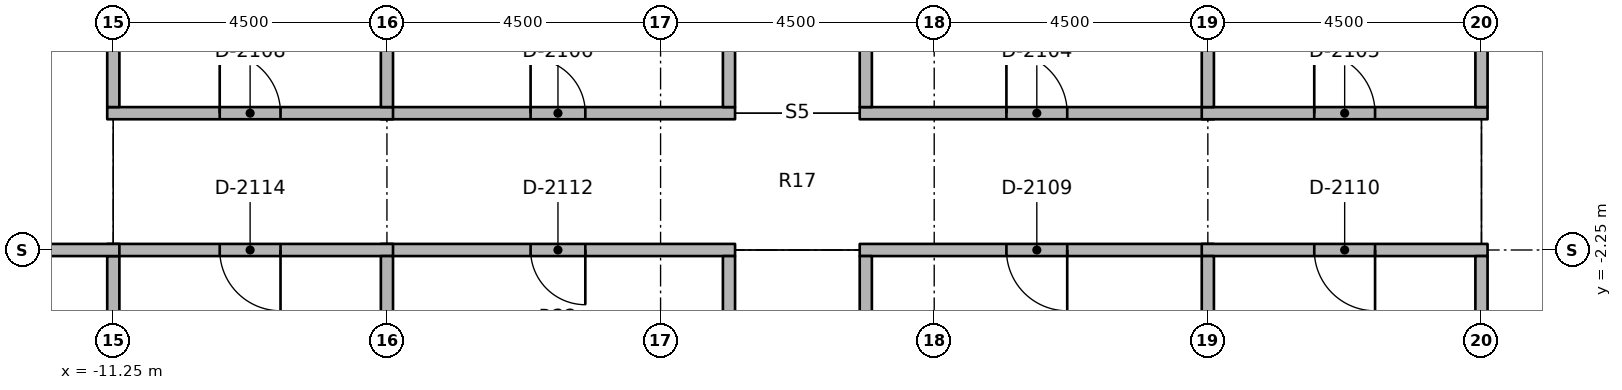
"""IFC4 building model, lengths in metres.
Left out: names, types, materials, properties, quantities, classifications, styles, units other than length and angle.
Written with IfcOpenShell. Run it as: python <this file> out.ifc"""

import sys

from ifc_helpers import new_model, si_unit, direction, frame, frame_2d, origin, place, context, subcontext, project, spatial, rectangle, extrude, element, fill, save


model = new_model("IFC4")
c1 = context("Model", 3, precision=1e-05, world=origin(), true_north=direction((0.0, 1.0)))
c2 = subcontext(c1, "Body", "Model", "MODEL_VIEW")
j1 = project(units=[si_unit("LENGTHUNIT", "METRE"), si_unit("PLANEANGLEUNIT", "RADIAN")], contexts=[c1])
p1 = place(None, origin())
s1 = spatial("IfcSite", under=j1, at=p1, CompositionType="ELEMENT")
p2 = place(p1, origin())
s2 = spatial("IfcBuilding", under=s1, at=p2, CompositionType="ELEMENT")
p3 = place(p2, frame((0.0, 0.0, 195.4)))
s3 = spatial("IfcBuildingStorey", under=s2, at=p3, CompositionType="ELEMENT", Elevation=195.4)
p4 = place(p3, frame((1.025, 0.0, 0.0), z_axis=(0.0, 0.0, 1.0), x_axis=(1.0, 0.0, 0.0)))
e1 = element("IfcWall", 1, at=p4, inside=s3, PredefinedType="PARTITIONING", context=c2, shape_type="SweptSolid", body=[
    extrude(rectangle(XDim=5.825, YDim=0.2, at=frame_2d((2.913, 0.0))), origin(), (0.0, 0.0, 1.0), 2.75),
])
p5 = place(p4, frame((2.413, 0.0, 0.0)))
e2 = element("IfcOpeningElement", 2, at=p5, cuts=e1, PredefinedType="OPENING", context=c2, shape_type="SweptSolid", body=[
    extrude(rectangle(XDim=1.0, YDim=2.1, at=frame_2d((0.5, 1.05))), frame((0.0, 0.11, 0.0), z_axis=(0.0, -1.0, 0.0), x_axis=(1.0, 0.0, 0.0)), (0.0, 0.0, 1.0), 0.22),
])
p6 = place(p3, frame((6.65, 0.0, 0.0), z_axis=(0.0, 0.0, 1.0), x_axis=(1.0, 0.0, 0.0)))
e3 = element("IfcWall", 3, at=p6, inside=s3, PredefinedType="PARTITIONING", context=c2, shape_type="SweptSolid", body=[
    extrude(rectangle(XDim=4.7, YDim=0.2, at=frame_2d((2.35, 0.0))), origin(), (0.0, 0.0, 1.0), 2.75),
])
p7 = place(p6, frame((1.85, 0.0, 0.0)))
e4 = element("IfcOpeningElement", 4, at=p7, cuts=e3, PredefinedType="OPENING", context=c2, shape_type="SweptSolid", body=[
    extrude(rectangle(XDim=1.0, YDim=2.1, at=frame_2d((0.5, 1.05))), frame((0.0, 0.11, 0.0), z_axis=(0.0, -1.0, 0.0), x_axis=(1.0, 0.0, 0.0)), (0.0, 0.0, 1.0), 0.22),
])
p8 = place(p3, frame((-6.85, 0.0, 0.0), z_axis=(0.0, 0.0, 1.0), x_axis=(1.0, 0.0, 0.0)))
e5 = element("IfcWall", 5, at=p8, inside=s3, PredefinedType="PARTITIONING", context=c2, shape_type="SweptSolid", body=[
    extrude(rectangle(XDim=5.825, YDim=0.2, at=frame_2d((2.913, 0.0))), origin(), (0.0, 0.0, 1.0), 2.75),
])
p9 = place(p8, frame((2.462, 0.0, 0.0)))
e6 = element("IfcOpeningElement", 6, at=p9, cuts=e5, PredefinedType="OPENING", context=c2, shape_type="SweptSolid", body=[
    extrude(rectangle(XDim=0.9, YDim=2.1, at=frame_2d((0.45, 1.05))), frame((0.0, 0.11, 0.0), z_axis=(0.0, -1.0, 0.0), x_axis=(1.0, 0.0, 0.0)), (0.0, 0.0, 1.0), 0.22),
])
p10 = place(p3, frame((-11.35, 0.0, 0.0), z_axis=(0.0, 0.0, 1.0), x_axis=(1.0, 0.0, 0.0)))
e7 = element("IfcWall", 7, at=p10, inside=s3, PredefinedType="PARTITIONING", context=c2, shape_type="SweptSolid", body=[
    extrude(rectangle(XDim=4.7, YDim=0.2, at=frame_2d((2.35, 0.0))), origin(), (0.0, 0.0, 1.0), 2.75),
])
p11 = place(p10, frame((1.85, 0.0, 0.0)))
e8 = element("IfcOpeningElement", 8, at=p11, cuts=e7, PredefinedType="OPENING", context=c2, shape_type="SweptSolid", body=[
    extrude(rectangle(XDim=1.0, YDim=2.1, at=frame_2d((0.5, 1.05))), frame((0.0, 0.11, 0.0), z_axis=(0.0, -1.0, 0.0), x_axis=(1.0, 0.0, 0.0)), (0.0, 0.0, 1.0), 0.22),
])
p12 = place(p3, frame((6.85, -2.25, 0.0), z_axis=(0.0, 0.0, 1.0), x_axis=(-1.0, 0.0, 0.0)))
e9 = element("IfcWall", 9, at=p12, inside=s3, PredefinedType="PARTITIONING", context=c2, shape_type="SweptSolid", body=[
    extrude(rectangle(XDim=5.825, YDim=0.2, at=frame_2d((2.913, 0.0))), origin(), (0.0, 0.0, 1.0), 2.75),
])
p13 = place(p12, frame((2.413, 0.0, 0.0)))
e10 = element("IfcOpeningElement", 10, at=p13, cuts=e9, PredefinedType="OPENING", context=c2, shape_type="SweptSolid", body=[
    extrude(rectangle(XDim=1.0, YDim=2.1, at=frame_2d((0.5, 1.05))), frame((0.0, 0.11, 0.0), z_axis=(0.0, -1.0, 0.0), x_axis=(1.0, 0.0, 0.0)), (0.0, 0.0, 1.0), 0.22),
])
p14 = place(p3, frame((11.35, -2.25, 0.0), z_axis=(0.0, 0.0, 1.0), x_axis=(-1.0, 0.0, 0.0)))
e11 = element("IfcWall", 11, at=p14, inside=s3, PredefinedType="PARTITIONING", context=c2, shape_type="SweptSolid", body=[
    extrude(rectangle(XDim=4.7, YDim=0.2, at=frame_2d((2.35, 0.0))), origin(), (0.0, 0.0, 1.0), 2.75),
])
p15 = place(p14, frame((1.85, 0.0, 0.0)))
e12 = element("IfcOpeningElement", 12, at=p15, cuts=e11, PredefinedType="OPENING", context=c2, shape_type="SweptSolid", body=[
    extrude(rectangle(XDim=1.0, YDim=2.1, at=frame_2d((0.5, 1.05))), frame((0.0, 0.11, 0.0), z_axis=(0.0, -1.0, 0.0), x_axis=(1.0, 0.0, 0.0)), (0.0, 0.0, 1.0), 0.22),
])
p16 = place(p3, frame((-1.025, -2.25, 0.0), z_axis=(0.0, 0.0, 1.0), x_axis=(-1.0, 0.0, 0.0)))
e13 = element("IfcWall", 13, at=p16, inside=s3, PredefinedType="PARTITIONING", context=c2, shape_type="SweptSolid", body=[
    extrude(rectangle(XDim=5.825, YDim=0.2, at=frame_2d((2.913, 0.0))), origin(), (0.0, 0.0, 1.0), 2.75),
])
p17 = place(p16, frame((2.462, 0.0, 0.0)))
e14 = element("IfcOpeningElement", 14, at=p17, cuts=e13, PredefinedType="OPENING", context=c2, shape_type="SweptSolid", body=[
    extrude(rectangle(XDim=0.9, YDim=2.1, at=frame_2d((0.45, 1.05))), frame((0.0, 0.11, 0.0), z_axis=(0.0, -1.0, 0.0), x_axis=(1.0, 0.0, 0.0)), (0.0, 0.0, 1.0), 0.22),
])
p18 = place(p3, frame((-6.65, -2.25, 0.0), z_axis=(0.0, 0.0, 1.0), x_axis=(-1.0, 0.0, 0.0)))
e15 = element("IfcWall", 15, at=p18, inside=s3, PredefinedType="PARTITIONING", context=c2, shape_type="SweptSolid", body=[
    extrude(rectangle(XDim=4.7, YDim=0.2, at=frame_2d((2.35, 0.0))), origin(), (0.0, 0.0, 1.0), 2.75),
])
p19 = place(p18, frame((1.85, 0.0, 0.0)))
e16 = element("IfcOpeningElement", 16, at=p19, cuts=e15, PredefinedType="OPENING", context=c2, shape_type="SweptSolid", body=[
    extrude(rectangle(XDim=1.0, YDim=2.1, at=frame_2d((0.5, 1.05))), frame((0.0, 0.11, 0.0), z_axis=(0.0, -1.0, 0.0), x_axis=(1.0, 0.0, 0.0)), (0.0, 0.0, 1.0), 0.22),
])
p20 = place(p3, frame((1.125, 0.1, 0.0), z_axis=(0.0, 0.0, 1.0), x_axis=(0.0, 1.0, 0.0)))
e17 = element("IfcWall", 17, at=p20, inside=s3, PredefinedType="PARTITIONING", context=c2, shape_type="SweptSolid", body=[
    extrude(rectangle(XDim=6.55, YDim=0.2, at=frame_2d((3.275, 0.0))), origin(), (0.0, 0.0, 1.0), 2.75),
])
p21 = place(p3, frame((-1.125, 0.1, 0.0), z_axis=(0.0, 0.0, 1.0), x_axis=(0.0, 1.0, 0.0)))
e18 = element("IfcWall", 18, at=p21, inside=s3, PredefinedType="PARTITIONING", context=c2, shape_type="SweptSolid", body=[
    extrude(rectangle(XDim=3.3, YDim=0.2, at=frame_2d((1.65, 0.0))), origin(), (0.0, 0.0, 1.0), 2.75),
])
p22 = place(p3, frame((1.125, -6.65, 0.0), z_axis=(0.0, 0.0, 1.0), x_axis=(0.0, 1.0, 0.0)))
e19 = element("IfcWall", 19, at=p22, inside=s3, PredefinedType="PARTITIONING", context=c2, shape_type="SweptSolid", body=[
    extrude(rectangle(XDim=4.3, YDim=0.2, at=frame_2d((2.15, 0.0))), origin(), (0.0, 0.0, 1.0), 2.75),
])
p23 = place(p3, frame((-1.125, -4.4, 0.0), z_axis=(0.0, 0.0, 1.0), x_axis=(0.0, 1.0, 0.0)))
e20 = element("IfcWall", 20, at=p23, inside=s3, PredefinedType="PARTITIONING", context=c2, shape_type="SweptSolid", body=[
    extrude(rectangle(XDim=2.05, YDim=0.2, at=frame_2d((1.025, 0.0))), origin(), (0.0, 0.0, 1.0), 2.75),
])
p24 = place(p3, frame((6.75, 0.1, 0.0), z_axis=(0.0, 0.0, 1.0), x_axis=(0.0, 1.0, 0.0)))
e21 = element("IfcWall", 21, at=p24, inside=s3, PredefinedType="PARTITIONING", context=c2, shape_type="SweptSolid", body=[
    extrude(rectangle(XDim=6.55, YDim=0.2, at=frame_2d((3.275, 0.0))), origin(), (0.0, 0.0, 1.0), 2.75),
])
p25 = place(p3, frame((11.25, 0.1, 0.0), z_axis=(0.0, 0.0, 1.0), x_axis=(0.0, 1.0, 0.0)))
e22 = element("IfcWall", 22, at=p25, inside=s3, PredefinedType="PARTITIONING", context=c2, shape_type="SweptSolid", body=[
    extrude(rectangle(XDim=6.07, YDim=0.2, at=frame_2d((3.035, 0.0))), origin(), (0.0, 0.0, 1.0), 2.75),
])
p26 = place(p3, frame((-6.75, 0.1, 0.0), z_axis=(0.0, 0.0, 1.0), x_axis=(0.0, 1.0, 0.0)))
e23 = element("IfcWall", 23, at=p26, inside=s3, PredefinedType="PARTITIONING", context=c2, shape_type="SweptSolid", body=[
    extrude(rectangle(XDim=3.3, YDim=0.2, at=frame_2d((1.65, 0.0))), origin(), (0.0, 0.0, 1.0), 2.75),
])
p27 = place(p3, frame((-11.25, 0.1, 0.0), z_axis=(0.0, 0.0, 1.0), x_axis=(0.0, 1.0, 0.0)))
e24 = element("IfcWall", 24, at=p27, inside=s3, PredefinedType="PARTITIONING", context=c2, shape_type="SweptSolid", body=[
    extrude(rectangle(XDim=2.05, YDim=0.2, at=frame_2d((1.025, 0.0))), origin(), (0.0, 0.0, 1.0), 2.75),
])
for number, where, z_axis, x_axis in (
    (25, (6.75, -6.65, 0.0), (0.0, 0.0, 1.0), (0.0, 1.0, 0.0)),
    (26, (11.25, -6.65, 0.0), (0.0, 0.0, 1.0), (0.0, 1.0, 0.0)),
):
    element("IfcWall", number, at=place(p3, frame(where, z_axis=z_axis, x_axis=x_axis)), inside=s3, PredefinedType="PARTITIONING", context=c2, shape_type="SweptSolid", body=[
        extrude(rectangle(XDim=4.3, YDim=0.2, at=frame_2d((2.15, 0.0))), origin(), (0.0, 0.0, 1.0), 2.75),
    ])
p28 = place(p3, frame((-6.75, -4.4, 0.0), z_axis=(0.0, 0.0, 1.0), x_axis=(0.0, 1.0, 0.0)))
e27 = element("IfcWall", 27, at=p28, inside=s3, PredefinedType="PARTITIONING", context=c2, shape_type="SweptSolid", body=[
    extrude(rectangle(XDim=2.05, YDim=0.2, at=frame_2d((1.025, 0.0))), origin(), (0.0, 0.0, 1.0), 2.75),
])
p29 = place(p3, frame((-11.25, -6.17, 0.0), z_axis=(0.0, 0.0, 1.0), x_axis=(0.0, 1.0, 0.0)))
e28 = element("IfcWall", 28, at=p29, inside=s3, PredefinedType="PARTITIONING", context=c2, shape_type="SweptSolid", body=[
    extrude(rectangle(XDim=3.82, YDim=0.2, at=frame_2d((1.91, 0.0))), origin(), (0.0, 0.0, 1.0), 2.75),
])
p30 = place(p3, frame((-11.15, -2.25, 0.0), z_axis=(0.0, 0.0, 1.0), x_axis=(-1.0, 0.0, 0.0)))
e29 = element("IfcWall", 29, at=p30, inside=s3, PredefinedType="PARTITIONING", context=c2, shape_type="SweptSolid", body=[
    extrude(rectangle(XDim=4.7, YDim=0.2, at=frame_2d((2.35, 0.0))), origin(), (0.0, 0.0, 1.0), 2.75),
])
p31 = place(p30, frame((1.85, 0.0, 0.0)))
e30 = element("IfcOpeningElement", 30, at=p31, cuts=e29, PredefinedType="OPENING", context=c2, shape_type="SweptSolid", body=[
    extrude(rectangle(XDim=1.0, YDim=2.1, at=frame_2d((0.5, 1.05))), frame((0.0, 0.11, 0.0), z_axis=(0.0, -1.0, 0.0), x_axis=(1.0, 0.0, 0.0)), (0.0, 0.0, 1.0), 0.22),
])
p32 = place(p5, origin())
e31 = element("IfcDoor", 31, at=p32, inside=s3, OperationType="SINGLE_SWING_RIGHT", PredefinedType="DOOR", context=c2, shape_type="SweptSolid", body=[
    extrude(rectangle(XDim=1.0, YDim=2.1, at=frame_2d((0.5, 1.05))), frame((0.0, 0.025, 0.0), z_axis=(0.0, -1.0, 0.0), x_axis=(1.0, 0.0, 0.0)), (0.0, 0.0, 1.0), 0.05),
])
fill(e2, e31)
p33 = place(p7, origin())
e32 = element("IfcDoor", 32, at=p33, inside=s3, OperationType="SINGLE_SWING_RIGHT", PredefinedType="DOOR", context=c2, shape_type="SweptSolid", body=[
    extrude(rectangle(XDim=1.0, YDim=2.1, at=frame_2d((0.5, 1.05))), frame((0.0, 0.025, 0.0), z_axis=(0.0, -1.0, 0.0), x_axis=(1.0, 0.0, 0.0)), (0.0, 0.0, 1.0), 0.05),
])
fill(e4, e32)
p34 = place(p9, origin())
e33 = element("IfcDoor", 33, at=p34, inside=s3, OperationType="SINGLE_SWING_RIGHT", PredefinedType="DOOR", context=c2, shape_type="SweptSolid", body=[
    extrude(rectangle(XDim=0.9, YDim=2.1, at=frame_2d((0.45, 1.05))), frame((0.0, 0.025, 0.0), z_axis=(0.0, -1.0, 0.0), x_axis=(1.0, 0.0, 0.0)), (0.0, 0.0, 1.0), 0.05),
])
fill(e6, e33)
p35 = place(p11, origin())
e34 = element("IfcDoor", 34, at=p35, inside=s3, OperationType="SINGLE_SWING_RIGHT", PredefinedType="DOOR", context=c2, shape_type="SweptSolid", body=[
    extrude(rectangle(XDim=1.0, YDim=2.1, at=frame_2d((0.5, 1.05))), frame((0.0, 0.025, 0.0), z_axis=(0.0, -1.0, 0.0), x_axis=(1.0, 0.0, 0.0)), (0.0, 0.0, 1.0), 0.05),
])
fill(e8, e34)
p36 = place(p13, origin())
e35 = element("IfcDoor", 35, at=p36, inside=s3, OperationType="SINGLE_SWING_RIGHT", PredefinedType="DOOR", context=c2, shape_type="SweptSolid", body=[
    extrude(rectangle(XDim=1.0, YDim=2.1, at=frame_2d((0.5, 1.05))), frame((0.0, 0.025, 0.0), z_axis=(0.0, -1.0, 0.0), x_axis=(1.0, 0.0, 0.0)), (0.0, 0.0, 1.0), 0.05),
])
fill(e10, e35)
p37 = place(p15, origin())
e36 = element("IfcDoor", 36, at=p37, inside=s3, OperationType="SINGLE_SWING_RIGHT", PredefinedType="DOOR", context=c2, shape_type="SweptSolid", body=[
    extrude(rectangle(XDim=1.0, YDim=2.1, at=frame_2d((0.5, 1.05))), frame((0.0, 0.025, 0.0), z_axis=(0.0, -1.0, 0.0), x_axis=(1.0, 0.0, 0.0)), (0.0, 0.0, 1.0), 0.05),
])
fill(e12, e36)
p38 = place(p17, origin())
e37 = element("IfcDoor", 37, at=p38, inside=s3, OperationType="SINGLE_SWING_RIGHT", PredefinedType="DOOR", context=c2, shape_type="SweptSolid", body=[
    extrude(rectangle(XDim=0.9, YDim=2.1, at=frame_2d((0.45, 1.05))), frame((0.0, 0.025, 0.0), z_axis=(0.0, -1.0, 0.0), x_axis=(1.0, 0.0, 0.0)), (0.0, 0.0, 1.0), 0.05),
])
fill(e14, e37)
p39 = place(p19, origin())
e38 = element("IfcDoor", 38, at=p39, inside=s3, OperationType="SINGLE_SWING_RIGHT", PredefinedType="DOOR", context=c2, shape_type="SweptSolid", body=[
    extrude(rectangle(XDim=1.0, YDim=2.1, at=frame_2d((0.5, 1.05))), frame((0.0, 0.025, 0.0), z_axis=(0.0, -1.0, 0.0), x_axis=(1.0, 0.0, 0.0)), (0.0, 0.0, 1.0), 0.05),
])
fill(e16, e38)
save(model, sys.argv[1])
